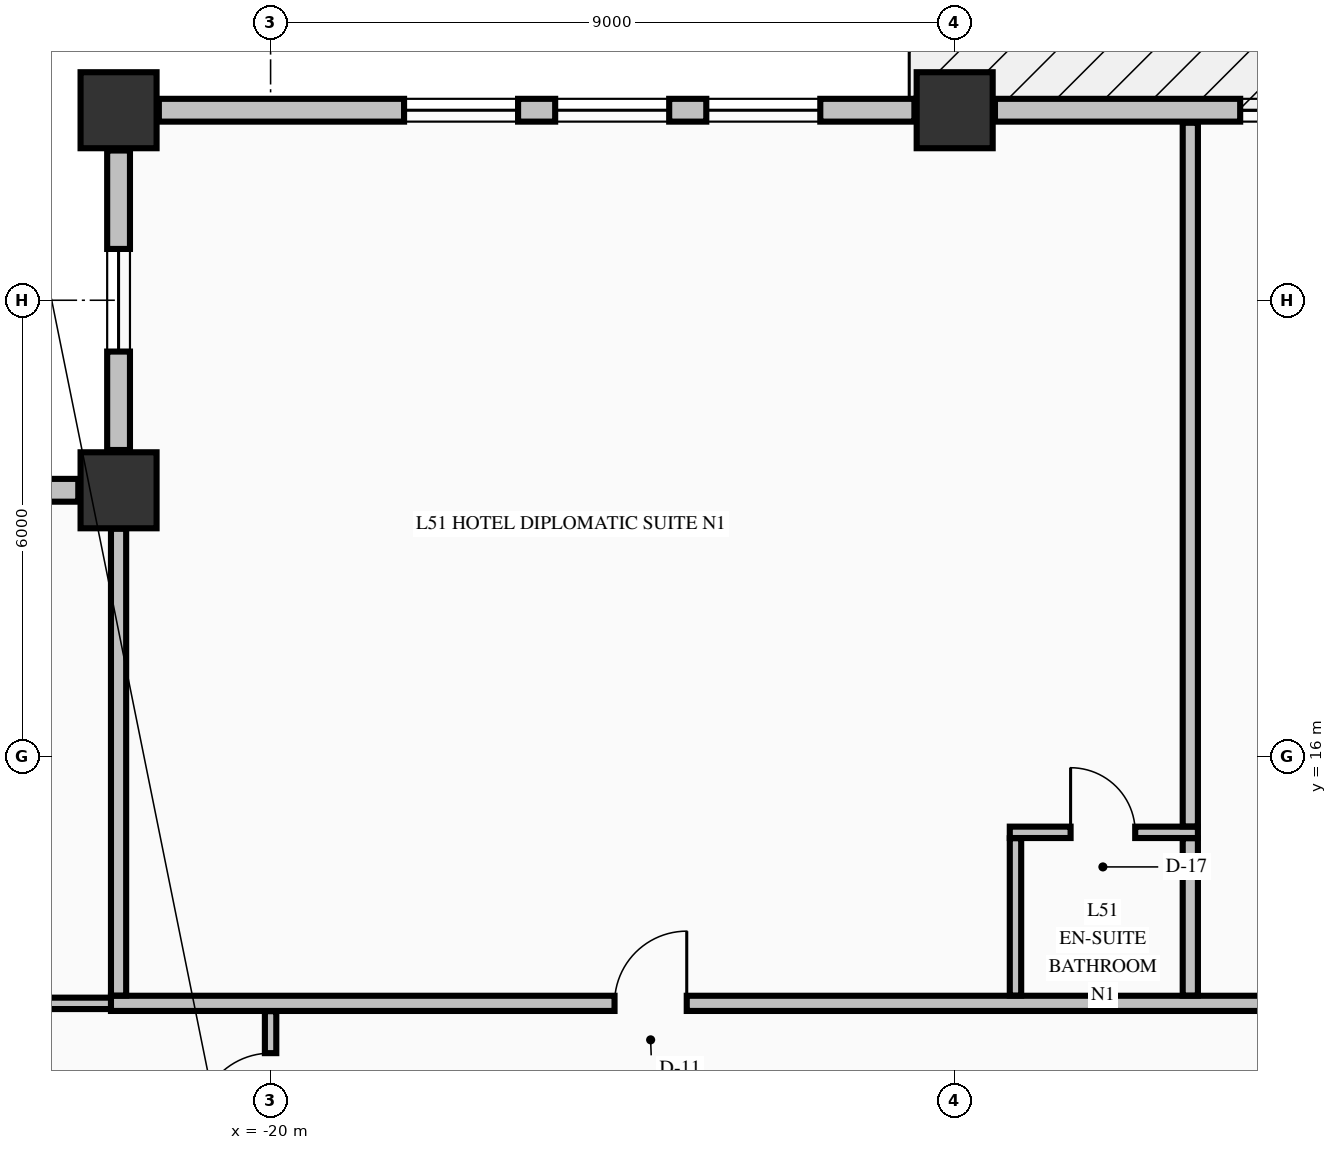
"""IFC4 building model, lengths in metres.
Left out: names, types, materials, properties, quantities, classifications, styles, units other than length and angle.
Written with IfcOpenShell. Run it as: python <this file> out.ifc"""

import sys

from ifc_helpers import new_model, si_unit, direction, frame, frame_2d, origin, origin_2d, place, context, subcontext, project, spatial, rectangle, extrude, element, fill, save


model = new_model("IFC4")
c1 = context("Model", 3, precision=1e-05, world=origin(), true_north=direction((0.0, 1.0)))
c2 = subcontext(c1, "Body", "Model", "MODEL_VIEW")
j1 = project(units=[si_unit("LENGTHUNIT", "METRE"), si_unit("PLANEANGLEUNIT", "RADIAN")], contexts=[c1])
p1 = place(None, origin())
s1 = spatial("IfcSite", under=j1, at=p1, CompositionType="ELEMENT")
p2 = place(p1, origin())
s2 = spatial("IfcBuilding", under=s1, at=p2, CompositionType="ELEMENT")
p3 = place(p2, frame((0.0, 0.0, 198.26)))
s3 = spatial("IfcBuildingStorey", under=s2, at=p3, CompositionType="ELEMENT", Elevation=198.26)
for number, where, z_axis, x_axis in (
    (1, (-22.0, 24.5, -0.25), (0.0, 0.0, 1.0), (1.0, 0.0, 0.0)),
    (2, (-11.0, 24.5, -0.25), (0.0, 0.0, 1.0), (1.0, 0.0, 0.0)),
    (3, (-22.0, 19.5, -0.25), (0.0, 0.0, 1.0), (1.0, 0.0, 0.0)),
):
    element("IfcColumn", number, at=place(p3, frame(where, z_axis=z_axis, x_axis=x_axis)), inside=s3, PredefinedType="COLUMN", context=c2, shape_type="SweptSolid", body=[
        extrude(rectangle(XDim=1.0, YDim=1.0, at=origin_2d()), origin(), (0.0, 0.0, 1.0), 3.4),
    ])
p4 = place(p3, frame((-22.0, 23.97, 0.0), z_axis=(0.0, 0.0, 1.0), x_axis=(0.0, -1.0, 0.0)))
e4 = element("IfcWall", 4, at=p4, inside=s3, PredefinedType="STANDARD", context=c2, shape_type="SweptSolid", body=[
    extrude(rectangle(XDim=3.94, YDim=0.3, at=frame_2d((1.97, 0.0))), origin(), (0.0, 0.0, 1.0), 2.542),
])
p5 = place(p4, frame((1.295, 0.0, 0.68)))
e5 = element("IfcOpeningElement", 5, at=p5, cuts=e4, PredefinedType="OPENING", context=c2, shape_type="SweptSolid", body=[
    extrude(rectangle(XDim=1.35, YDim=1.42, at=frame_2d((0.675, 0.71))), frame((0.0, 0.16, 0.0), z_axis=(0.0, -1.0, 0.0), x_axis=(1.0, 0.0, 0.0)), (0.0, 0.0, 1.0), 0.32),
])
p6 = place(p3, frame((-22.53, 19.5, 0.0), z_axis=(0.0, 0.0, 1.0), x_axis=(-1.0, 0.0, 0.0)))
e6 = element("IfcWall", 6, at=p6, inside=s3, PredefinedType="STANDARD", context=c2, shape_type="SweptSolid", body=[
    extrude(rectangle(XDim=3.94, YDim=0.3, at=frame_2d((1.97, 0.0))), origin(), (0.0, 0.0, 1.0), 2.542),
])
p7 = place(p6, frame((1.295, 0.0, 0.68)))
e7 = element("IfcOpeningElement", 7, at=p7, cuts=e6, PredefinedType="OPENING", context=c2, shape_type="SweptSolid", body=[
    extrude(rectangle(XDim=1.35, YDim=1.42, at=frame_2d((0.675, 0.71))), frame((0.0, 0.16, 0.0), z_axis=(0.0, -1.0, 0.0), x_axis=(1.0, 0.0, 0.0)), (0.0, 0.0, 1.0), 0.32),
])
p8 = place(p3, frame((-11.53, 24.5, 0.0), z_axis=(0.0, 0.0, 1.0), x_axis=(-1.0, 0.0, 0.0)))
e8 = element("IfcWall", 8, at=p8, inside=s3, PredefinedType="STANDARD", context=c2, shape_type="SweptSolid", body=[
    extrude(rectangle(XDim=9.94, YDim=0.3, at=frame_2d((4.97, 0.0))), origin(), (0.0, 0.0, 1.0), 2.542),
])
p9 = place(p8, frame((1.238, 0.0, 0.72)))
e9 = element("IfcOpeningElement", 9, at=p9, cuts=e8, PredefinedType="OPENING", context=c2, shape_type="SweptSolid", body=[
    extrude(rectangle(XDim=1.5, YDim=1.6, at=frame_2d((0.75, 0.8))), frame((0.0, 0.16, 0.0), z_axis=(0.0, -1.0, 0.0), x_axis=(1.0, 0.0, 0.0)), (0.0, 0.0, 1.0), 0.32),
])
p10 = place(p8, frame((3.226, 0.0, 0.72)))
e10 = element("IfcOpeningElement", 10, at=p10, cuts=e8, PredefinedType="OPENING", context=c2, shape_type="SweptSolid", body=[
    extrude(rectangle(XDim=1.5, YDim=1.6, at=frame_2d((0.75, 0.8))), frame((0.0, 0.16, 0.0), z_axis=(0.0, -1.0, 0.0), x_axis=(1.0, 0.0, 0.0)), (0.0, 0.0, 1.0), 0.32),
])
p11 = place(p8, frame((5.214, 0.0, 0.72)))
e11 = element("IfcOpeningElement", 11, at=p11, cuts=e8, PredefinedType="OPENING", context=c2, shape_type="SweptSolid", body=[
    extrude(rectangle(XDim=1.5, YDim=1.6, at=frame_2d((0.75, 0.8))), frame((0.0, 0.16, 0.0), z_axis=(0.0, -1.0, 0.0), x_axis=(1.0, 0.0, 0.0)), (0.0, 0.0, 1.0), 0.32),
])
p12 = place(p3, frame((-0.53, 24.5, 0.0), z_axis=(0.0, 0.0, 1.0), x_axis=(-1.0, 0.0, 0.0)))
e12 = element("IfcWall", 12, at=p12, inside=s3, PredefinedType="STANDARD", context=c2, shape_type="SweptSolid", body=[
    extrude(rectangle(XDim=9.94, YDim=0.3, at=frame_2d((4.97, 0.0))), origin(), (0.0, 0.0, 1.0), 2.542),
])
p13 = place(p12, frame((1.255, 0.0, 0.0)))
e13 = element("IfcOpeningElement", 13, at=p13, cuts=e12, PredefinedType="OPENING", context=c2, shape_type="SweptSolid", body=[
    extrude(rectangle(XDim=1.1, YDim=2.15, at=frame_2d((0.55, 1.075))), frame((0.0, 0.16, 0.0), z_axis=(0.0, -1.0, 0.0), x_axis=(1.0, 0.0, 0.0)), (0.0, 0.0, 1.0), 0.32),
])
p14 = place(p12, frame((3.226, 0.0, 0.72)))
e14 = element("IfcOpeningElement", 14, at=p14, cuts=e12, PredefinedType="OPENING", context=c2, shape_type="SweptSolid", body=[
    extrude(rectangle(XDim=1.5, YDim=1.6, at=frame_2d((0.75, 0.8))), frame((0.0, 0.16, 0.0), z_axis=(0.0, -1.0, 0.0), x_axis=(1.0, 0.0, 0.0)), (0.0, 0.0, 1.0), 0.32),
])
p15 = place(p12, frame((5.214, 0.0, 0.72)))
e15 = element("IfcOpeningElement", 15, at=p15, cuts=e12, PredefinedType="OPENING", context=c2, shape_type="SweptSolid", body=[
    extrude(rectangle(XDim=1.5, YDim=1.6, at=frame_2d((0.75, 0.8))), frame((0.0, 0.16, 0.0), z_axis=(0.0, -1.0, 0.0), x_axis=(1.0, 0.0, 0.0)), (0.0, 0.0, 1.0), 0.32),
])
p16 = place(p3, frame((-26.835, 12.75, 0.0), z_axis=(0.0, 0.0, 1.0), x_axis=(1.0, 0.0, 0.0)))
e16 = element("IfcWall", 16, at=p16, inside=s3, PredefinedType="PARTITIONING", context=c2, shape_type="SweptSolid", body=[
    extrude(rectangle(XDim=4.935, YDim=0.15, at=frame_2d((2.468, 0.0))), origin(), (0.0, 0.0, 1.0), 3.15),
])
p17 = place(p3, frame((-22.1, 12.75, 0.0), z_axis=(0.0, 0.0, 1.0), x_axis=(1.0, 0.0, 0.0)))
e17 = element("IfcWall", 17, at=p17, inside=s3, PredefinedType="PARTITIONING", context=c2, shape_type="SweptSolid", body=[
    extrude(rectangle(XDim=39.2, YDim=0.2, at=frame_2d((19.6, 0.0))), origin(), (0.0, 0.0, 1.0), 3.15),
])
p18 = place(p17, frame((6.625, 0.0, 0.0)))
e18 = element("IfcOpeningElement", 18, at=p18, cuts=e17, PredefinedType="OPENING", context=c2, shape_type="SweptSolid", body=[
    extrude(rectangle(XDim=0.95, YDim=2.15, at=frame_2d((0.475, 1.075))), frame((0.0, 0.11, 0.0), z_axis=(0.0, -1.0, 0.0), x_axis=(1.0, 0.0, 0.0)), (0.0, 0.0, 1.0), 0.22),
])
p19 = place(p17, frame((18.075, 0.0, 0.0)))
e19 = element("IfcOpeningElement", 19, at=p19, cuts=e17, PredefinedType="OPENING", context=c2, shape_type="SweptSolid", body=[
    extrude(rectangle(XDim=0.95, YDim=2.15, at=frame_2d((0.475, 1.075))), frame((0.0, 0.11, 0.0), z_axis=(0.0, -1.0, 0.0), x_axis=(1.0, 0.0, 0.0)), (0.0, 0.0, 1.0), 0.22),
])
p20 = place(p17, frame((30.525, 0.0, 0.0)))
e20 = element("IfcOpeningElement", 20, at=p20, cuts=e17, PredefinedType="OPENING", context=c2, shape_type="SweptSolid", body=[
    extrude(rectangle(XDim=0.95, YDim=2.15, at=frame_2d((0.475, 1.075))), frame((0.0, 0.11, 0.0), z_axis=(0.0, -1.0, 0.0), x_axis=(1.0, 0.0, 0.0)), (0.0, 0.0, 1.0), 0.22),
])
p21 = place(p3, frame((-10.275, 15.0, 0.0), z_axis=(0.0, 0.0, 1.0), x_axis=(1.0, 0.0, 0.0)))
e21 = element("IfcWall", 21, at=p21, inside=s3, PredefinedType="PARTITIONING", context=c2, shape_type="SweptSolid", body=[
    extrude(rectangle(XDim=2.475, YDim=0.15, at=frame_2d((1.237, 0.0))), origin(), (0.0, 0.0, 1.0), 3.15),
])
p22 = place(p21, frame((0.8, 0.0, 0.0)))
e22 = element("IfcOpeningElement", 22, at=p22, cuts=e21, PredefinedType="OPENING", context=c2, shape_type="SweptSolid", body=[
    extrude(rectangle(XDim=0.85, YDim=2.1, at=frame_2d((0.425, 1.05))), frame((0.0, 0.085, 0.0), z_axis=(0.0, -1.0, 0.0), x_axis=(1.0, 0.0, 0.0)), (0.0, 0.0, 1.0), 0.17),
])
p23 = place(p3, frame((-22.0, 12.853, 0.0), z_axis=(0.0, 0.0, 1.0), x_axis=(0.0, 1.0, 0.0)))
e23 = element("IfcWall", 23, at=p23, inside=s3, PredefinedType="PARTITIONING", context=c2, shape_type="SweptSolid", body=[
    extrude(rectangle(XDim=6.141, YDim=0.2, at=frame_2d((3.07, 0.0))), origin(), (0.0, 0.0, 1.0), 3.15),
])
p24 = place(p3, frame((-20.0, 10.931, 0.0), z_axis=(0.0, 0.0, 1.0), x_axis=(0.0, 1.0, 0.0)))
e24 = element("IfcWall", 24, at=p24, inside=s3, PredefinedType="PARTITIONING", context=c2, shape_type="SweptSolid", body=[
    extrude(rectangle(XDim=1.716, YDim=0.15, at=frame_2d((0.858, 0.0))), origin(), (0.0, 0.0, 1.0), 2.342),
])
p25 = place(p24, frame((0.214, 0.0, 0.0)))
e25 = element("IfcOpeningElement", 25, at=p25, cuts=e24, PredefinedType="OPENING", context=c2, shape_type="SweptSolid", body=[
    extrude(rectangle(XDim=0.95, YDim=2.15, at=frame_2d((0.475, 1.075))), frame((0.0, 0.085, 0.0), z_axis=(0.0, -1.0, 0.0), x_axis=(1.0, 0.0, 0.0)), (0.0, 0.0, 1.0), 0.17),
])
p26 = place(p3, frame((-10.2, 12.853, 0.0), z_axis=(0.0, 0.0, 1.0), x_axis=(0.0, 1.0, 0.0)))
e26 = element("IfcWall", 26, at=p26, inside=s3, PredefinedType="PARTITIONING", context=c2, shape_type="SweptSolid", body=[
    extrude(rectangle(XDim=2.069, YDim=0.15, at=frame_2d((1.035, 0.0))), origin(), (0.0, 0.0, 1.0), 3.15),
])
p27 = place(p3, frame((-7.9, 12.853, 0.0), z_axis=(0.0, 0.0, 1.0), x_axis=(0.0, 1.0, 0.0)))
e27 = element("IfcWall", 27, at=p27, inside=s3, PredefinedType="PARTITIONING", context=c2, shape_type="SweptSolid", body=[
    extrude(rectangle(XDim=2.069, YDim=0.2, at=frame_2d((1.035, 0.0))), origin(), (0.0, 0.0, 1.0), 3.15),
])
p28 = place(p3, frame((-7.9, 15.078, 0.0), z_axis=(0.0, 0.0, 1.0), x_axis=(0.0, 1.0, 0.0)))
e28 = element("IfcWall", 28, at=p28, inside=s3, PredefinedType="PARTITIONING", context=c2, shape_type="SweptSolid", body=[
    extrude(rectangle(XDim=9.257, YDim=0.2, at=frame_2d((4.628, 0.0))), origin(), (0.0, 0.0, 1.0), 3.15),
])
p29 = place(p5, origin())
e29 = element("IfcWindow", 29, at=p29, inside=s3, PartitioningType="SINGLE_PANEL", PredefinedType="WINDOW", context=c2, shape_type="SweptSolid", body=[
    extrude(rectangle(XDim=1.35, YDim=1.42, at=frame_2d((0.675, 0.71))), frame((0.0, 0.03, 0.0), z_axis=(0.0, -1.0, 0.0), x_axis=(1.0, 0.0, 0.0)), (0.0, 0.0, 1.0), 0.06),
])
fill(e5, e29)
p30 = place(p9, origin())
e30 = element("IfcWindow", 30, at=p30, inside=s3, PartitioningType="SINGLE_PANEL", PredefinedType="WINDOW", context=c2, shape_type="SweptSolid", body=[
    extrude(rectangle(XDim=1.5, YDim=1.6, at=frame_2d((0.75, 0.8))), frame((0.0, 0.03, 0.0), z_axis=(0.0, -1.0, 0.0), x_axis=(1.0, 0.0, 0.0)), (0.0, 0.0, 1.0), 0.06),
])
fill(e9, e30)
p31 = place(p10, origin())
e31 = element("IfcWindow", 31, at=p31, inside=s3, PartitioningType="SINGLE_PANEL", PredefinedType="WINDOW", context=c2, shape_type="SweptSolid", body=[
    extrude(rectangle(XDim=1.5, YDim=1.6, at=frame_2d((0.75, 0.8))), frame((0.0, 0.03, 0.0), z_axis=(0.0, -1.0, 0.0), x_axis=(1.0, 0.0, 0.0)), (0.0, 0.0, 1.0), 0.06),
])
fill(e10, e31)
p32 = place(p11, origin())
e32 = element("IfcWindow", 32, at=p32, inside=s3, PartitioningType="SINGLE_PANEL", PredefinedType="WINDOW", context=c2, shape_type="SweptSolid", body=[
    extrude(rectangle(XDim=1.5, YDim=1.6, at=frame_2d((0.75, 0.8))), frame((0.0, 0.03, 0.0), z_axis=(0.0, -1.0, 0.0), x_axis=(1.0, 0.0, 0.0)), (0.0, 0.0, 1.0), 0.06),
])
fill(e11, e32)
p33 = place(p15, origin())
e33 = element("IfcWindow", 33, at=p33, inside=s3, PartitioningType="SINGLE_PANEL", PredefinedType="WINDOW", context=c2, shape_type="SweptSolid", body=[
    extrude(rectangle(XDim=1.5, YDim=1.6, at=frame_2d((0.75, 0.8))), frame((0.0, 0.03, 0.0), z_axis=(0.0, -1.0, 0.0), x_axis=(1.0, 0.0, 0.0)), (0.0, 0.0, 1.0), 0.06),
])
fill(e15, e33)
p34 = place(p18, origin())
e34 = element("IfcDoor", 34, at=p34, inside=s3, OperationType="SINGLE_SWING_RIGHT", PredefinedType="DOOR", context=c2, shape_type="SweptSolid", body=[
    extrude(rectangle(XDim=0.95, YDim=2.15, at=frame_2d((0.475, 1.075))), frame((0.0, 0.025, 0.0), z_axis=(0.0, -1.0, 0.0), x_axis=(1.0, 0.0, 0.0)), (0.0, 0.0, 1.0), 0.05),
])
fill(e18, e34)
p35 = place(p22, origin())
e35 = element("IfcDoor", 35, at=p35, inside=s3, OperationType="SINGLE_SWING_LEFT", PredefinedType="DOOR", context=c2, shape_type="SweptSolid", body=[
    extrude(rectangle(XDim=0.85, YDim=2.1, at=frame_2d((0.425, 1.05))), frame((0.0, 0.025, 0.0), z_axis=(0.0, -1.0, 0.0), x_axis=(1.0, 0.0, 0.0)), (0.0, 0.0, 1.0), 0.05),
])
fill(e22, e35)
p36 = place(p25, origin())
e36 = element("IfcDoor", 36, at=p36, inside=s3, OperationType="SINGLE_SWING_LEFT", PredefinedType="DOOR", context=c2, shape_type="SweptSolid", body=[
    extrude(rectangle(XDim=0.95, YDim=2.15, at=frame_2d((0.475, 1.075))), frame((0.0, 0.025, 0.0), z_axis=(0.0, -1.0, 0.0), x_axis=(1.0, 0.0, 0.0)), (0.0, 0.0, 1.0), 0.05),
])
fill(e25, e36)
save(model, sys.argv[1])
